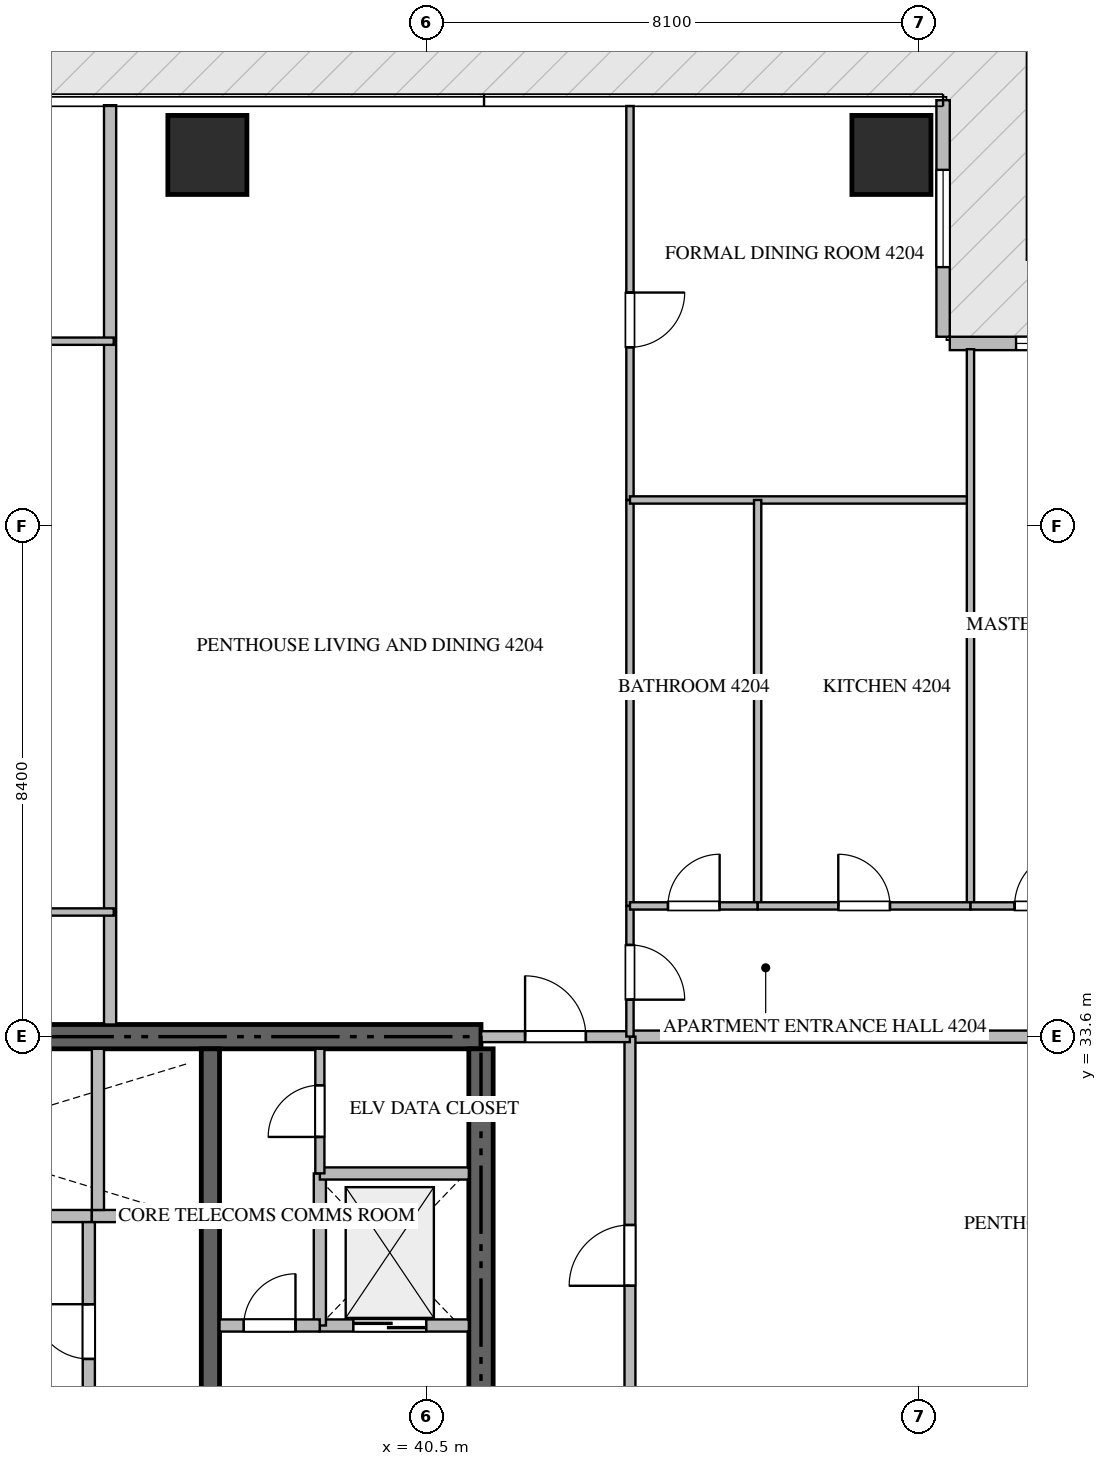
"""IFC4 building model, lengths in metres.
Left out: names, types, materials, properties, quantities, classifications, styles, units other than length and angle.
Written with IfcOpenShell. Run it as: python <this file> out.ifc"""

import sys

from ifc_helpers import new_model, si_unit, direction, frame, frame_2d, origin, origin_2d, place, context, subcontext, project, spatial, rectangle, extrude, source, transform, mapped, element, fill, save


model = new_model("IFC4")
c1 = context("Model", 3, precision=1e-05, world=origin(), true_north=direction((0.0, 1.0)))
c2 = subcontext(c1, "Body", "Model", "MODEL_VIEW")
j1 = project(units=[si_unit("LENGTHUNIT", "METRE"), si_unit("PLANEANGLEUNIT", "RADIAN")], contexts=[c1])
p1 = place(None, origin())
s1 = spatial("IfcSite", under=j1, at=p1, CompositionType="ELEMENT")
p2 = place(p1, origin())
s2 = spatial("IfcBuilding", under=s1, at=p2, CompositionType="ELEMENT")
p3 = place(p2, frame((0.0, 0.0, 168.9)))
s3 = spatial("IfcBuildingStorey", under=s2, at=p3, CompositionType="ELEMENT", Elevation=168.9)
p4 = place(p3, frame((41.4, 33.6, -0.26), z_axis=(0.0, 0.0, 1.0), x_axis=(-1.0, 0.0, 0.0)))
e1 = element("IfcWall", 1, at=p4, inside=s3, PredefinedType="SHEAR", context=c2, shape_type="SweptSolid", body=[
    extrude(rectangle(XDim=18.0, YDim=0.4, at=frame_2d((9.0, 0.0))), origin(), (0.0, 0.0, 1.0), 3.748),
])
p5 = place(p3, frame((41.4, 27.75, -0.26), z_axis=(0.0, 0.0, 1.0), x_axis=(0.0, 1.0, 0.0)))
e2 = element("IfcWall", 2, at=p5, inside=s3, PredefinedType="SHEAR", context=c2, shape_type="SweptSolid", body=[
    extrude(rectangle(XDim=5.65, YDim=0.4, at=frame_2d((2.825, 0.0))), origin(), (0.0, 0.0, 1.0), 3.748),
])
p6 = place(p3, frame((36.95, 27.05, -0.26), z_axis=(0.0, 0.0, 1.0), x_axis=(0.0, 1.0, 0.0)))
e3 = element("IfcWall", 3, at=p6, inside=s3, PredefinedType="SHEAR", context=c2, shape_type="SweptSolid", body=[
    extrude(rectangle(XDim=6.35, YDim=0.3, at=frame_2d((3.175, 0.0))), origin(), (0.0, 0.0, 1.0), 3.748),
])
m1 = source(origin(), c2, "Body", "SweptSolid", [
    extrude(rectangle(XDim=1.3, YDim=1.3, at=origin_2d()), origin(), (0.0, 0.0, 1.0), 3.75),
])
for number, where, z_axis, x_axis in (
    (4, (36.9, 48.1, -0.26), (0.0, 0.0, 1.0), (1.0, 0.0, 0.0)),
    (5, (48.15, 48.1, -0.26), (0.0, 0.0, 1.0), (1.0, 0.0, 0.0)),
):
    element("IfcColumn", number, at=place(p3, frame(where, z_axis=z_axis, x_axis=x_axis)), inside=s3, PredefinedType="COLUMN", context=c2, shape_type="MappedRepresentation", body=[
        mapped(m1, transform((0.0, 0.0, 0.0), scale=1.0)),
    ])
p7 = place(p3, frame((52.89, 45.0, 0.0), z_axis=(0.0, 0.0, 1.0), x_axis=(-1.0, 0.0, 0.0)))
e6 = element("IfcWall", 6, at=p7, inside=s3, PredefinedType="ELEMENTEDWALL", context=c2, shape_type="SweptSolid", body=[
    extrude(rectangle(XDim=3.78, YDim=0.22, at=frame_2d((1.89, 0.0))), origin(), (0.0, 0.0, 1.0), 3.475),
])
p8 = place(p7, frame((1.09, 0.0, 0.65)))
e7 = element("IfcOpeningElement", 7, at=p8, cuts=e6, PredefinedType="OPENING", context=c2, shape_type="SweptSolid", body=[
    extrude(rectangle(XDim=1.6, YDim=2.1, at=frame_2d((0.8, 1.05))), frame((0.0, 0.12, 0.0), z_axis=(0.0, -1.0, 0.0), x_axis=(1.0, 0.0, 0.0)), (0.0, 0.0, 1.0), 0.24),
])
p9 = place(p3, frame((49.0, 45.11, 0.0), z_axis=(0.0, 0.0, 1.0), x_axis=(0.0, 1.0, 0.0)))
e8 = element("IfcWall", 8, at=p9, inside=s3, PredefinedType="ELEMENTEDWALL", context=c2, shape_type="SweptSolid", body=[
    extrude(rectangle(XDim=3.89, YDim=0.22, at=frame_2d((1.945, 0.0))), origin(), (0.0, 0.0, 1.0), 3.475),
])
p10 = place(p9, frame((1.145, 0.0, 0.65)))
e9 = element("IfcOpeningElement", 9, at=p10, cuts=e8, PredefinedType="OPENING", context=c2, shape_type="SweptSolid", body=[
    extrude(rectangle(XDim=1.6, YDim=2.1, at=frame_2d((0.8, 1.05))), frame((0.0, 0.12, 0.0), z_axis=(0.0, -1.0, 0.0), x_axis=(1.0, 0.0, 0.0)), (0.0, 0.0, 1.0), 0.24),
])
p11 = place(p3, frame((38.75, 28.85, 0.0), z_axis=(0.0, 0.0, 1.0), x_axis=(1.0, 0.0, 0.0)))
e10 = element("IfcWall", 10, at=p11, inside=s3, PredefinedType="STANDARD", context=c2, shape_type="SweptSolid", body=[
    extrude(rectangle(XDim=2.45, YDim=0.2, at=frame_2d((1.225, 0.0))), origin(), (0.0, 0.0, 1.0), 3.49),
])
p12 = place(p11, frame((0.55, 0.0, 0.0)))
e11 = element("IfcOpeningElement", 11, at=p12, cuts=e10, PredefinedType="OPENING", context=c2, shape_type="SweptSolid", body=[
    extrude(rectangle(XDim=1.2, YDim=2.2, at=frame_2d((0.6, 1.1))), frame((0.0, 0.11, 0.0), z_axis=(0.0, -1.0, 0.0), x_axis=(1.0, 0.0, 0.0)), (0.0, 0.0, 1.0), 0.22),
])
p13 = place(p3, frame((32.85, 30.65, 0.0), z_axis=(0.0, 0.0, 1.0), x_axis=(1.0, 0.0, 0.0)))
e12 = element("IfcWall", 12, at=p13, inside=s3, PredefinedType="STANDARD", context=c2, shape_type="SweptSolid", body=[
    extrude(rectangle(XDim=2.15, YDim=0.2, at=frame_2d((1.075, 0.0))), origin(), (0.0, 0.0, 1.0), 3.49),
])
p14 = place(p3, frame((35.0, 30.65, 0.0), z_axis=(0.0, 0.0, 1.0), x_axis=(1.0, 0.0, 0.0)))
e13 = element("IfcWall", 13, at=p14, inside=s3, PredefinedType="STANDARD", context=c2, shape_type="SweptSolid", body=[
    extrude(rectangle(XDim=1.8, YDim=0.2, at=frame_2d((0.9, 0.0))), origin(), (0.0, 0.0, 1.0), 3.49),
])
p15 = place(p3, frame((35.1, 30.75, 0.0), z_axis=(0.0, 0.0, 1.0), x_axis=(0.0, 1.0, 0.0)))
e14 = element("IfcWall", 14, at=p15, inside=s3, PredefinedType="STANDARD", context=c2, shape_type="SweptSolid", body=[
    extrude(rectangle(XDim=2.65, YDim=0.2, at=frame_2d((1.325, 0.0))), origin(), (0.0, 0.0, 1.0), 3.49),
])
p16 = place(p3, frame((38.75, 28.85, 0.0), z_axis=(0.0, 0.0, 1.0), x_axis=(0.0, 1.0, 0.0)))
e15 = element("IfcWall", 15, at=p16, inside=s3, PredefinedType="STANDARD", context=c2, shape_type="SweptSolid", body=[
    extrude(rectangle(XDim=2.5, YDim=0.2, at=frame_2d((1.25, 0.0))), origin(), (0.0, 0.0, 1.0), 3.49),
])
p17 = place(p3, frame((38.75, 31.35, 0.0), z_axis=(0.0, 0.0, 1.0), x_axis=(1.0, 0.0, 0.0)))
e16 = element("IfcWall", 16, at=p17, inside=s3, PredefinedType="STANDARD", context=c2, shape_type="SweptSolid", body=[
    extrude(rectangle(XDim=2.45, YDim=0.2, at=frame_2d((1.225, 0.0))), origin(), (0.0, 0.0, 1.0), 3.49),
])
p18 = place(p3, frame((37.1, 28.85, 0.0), z_axis=(0.0, 0.0, 1.0), x_axis=(1.0, 0.0, 0.0)))
e17 = element("IfcWall", 17, at=p18, inside=s3, PredefinedType="STANDARD", context=c2, shape_type="SweptSolid", body=[
    extrude(rectangle(XDim=1.648, YDim=0.2, at=frame_2d((0.824, 0.0))), origin(), (0.0, 0.0, 1.0), 3.49),
])
p19 = place(p18, frame((0.399, 0.0, 0.0)))
e18 = element("IfcOpeningElement", 18, at=p19, cuts=e17, PredefinedType="OPENING", context=c2, shape_type="SweptSolid", body=[
    extrude(rectangle(XDim=0.85, YDim=2.1, at=frame_2d((0.425, 1.05))), frame((0.0, 0.11, 0.0), z_axis=(0.0, -1.0, 0.0), x_axis=(1.0, 0.0, 0.0)), (0.0, 0.0, 1.0), 0.22),
])
p20 = place(p3, frame((38.75, 31.352, 0.0), z_axis=(0.0, 0.0, 1.0), x_axis=(0.0, 1.0, 0.0)))
e19 = element("IfcWall", 19, at=p20, inside=s3, PredefinedType="PARTITIONING", context=c2, shape_type="SweptSolid", body=[
    extrude(rectangle(XDim=2.048, YDim=0.15, at=frame_2d((1.024, 0.0))), origin(), (0.0, 0.0, 1.0), 3.49),
])
p21 = place(p20, frame((0.599, 0.0, 0.0)))
e20 = element("IfcOpeningElement", 20, at=p21, cuts=e19, PredefinedType="OPENING", context=c2, shape_type="SweptSolid", body=[
    extrude(rectangle(XDim=0.85, YDim=2.1, at=frame_2d((0.425, 1.05))), frame((0.0, 0.085, 0.0), z_axis=(0.0, -1.0, 0.0), x_axis=(1.0, 0.0, 0.0)), (0.0, 0.0, 1.0), 0.17),
])
p22 = place(p3, frame((34.95, 26.95, 0.0), z_axis=(0.0, 0.0, 1.0), x_axis=(0.0, 1.0, 0.0)))
e21 = element("IfcWall", 21, at=p22, inside=s3, PredefinedType="STANDARD", context=c2, shape_type="SweptSolid", body=[
    extrude(rectangle(XDim=3.6, YDim=0.2, at=frame_2d((1.8, 0.0))), origin(), (0.0, 0.0, 1.0), 3.49),
])
p23 = place(p22, frame((1.35, 0.0, 0.0)))
e22 = element("IfcOpeningElement", 22, at=p23, cuts=e21, PredefinedType="OPENING", context=c2, shape_type="SweptSolid", body=[
    extrude(rectangle(XDim=0.9, YDim=2.1, at=frame_2d((0.45, 1.05))), frame((0.0, 0.11, 0.0), z_axis=(0.0, -1.0, 0.0), x_axis=(1.0, 0.0, 0.0)), (0.0, 0.0, 1.0), 0.22),
])
p24 = place(p3, frame((35.3, 33.8, 0.0), z_axis=(0.0, 0.0, 1.0), x_axis=(0.0, 1.0, 0.0)))
e23 = element("IfcWall", 23, at=p24, inside=s3, PredefinedType="PARTITIONING", context=c2, shape_type="SweptSolid", body=[
    extrude(rectangle(XDim=15.118, YDim=0.2, at=frame_2d((7.559, 0.0))), origin(), (0.0, 0.0, 1.0), 3.49),
])
p25 = place(p3, frame((43.85, 33.6, 0.0), z_axis=(0.0, 0.0, 1.0), x_axis=(1.0, 0.0, 0.0)))
e24 = element("IfcWall", 24, at=p25, inside=s3, PredefinedType="PARTITIONING", context=c2, shape_type="SweptSolid", body=[
    extrude(rectangle(XDim=13.068, YDim=0.2, at=frame_2d((6.534, 0.0))), origin(), (0.0, 0.0, 1.0), 3.49),
])
p26 = place(p3, frame((43.85, 14.9, 0.0), z_axis=(0.0, 0.0, 1.0), x_axis=(0.0, 1.0, 0.0)))
e25 = element("IfcWall", 25, at=p26, inside=s3, PredefinedType="PARTITIONING", context=c2, shape_type="SweptSolid", body=[
    extrude(rectangle(XDim=18.7, YDim=0.18, at=frame_2d((9.35, 0.0))), origin(), (0.0, 0.0, 1.0), 3.49),
])
p27 = place(p26, frame((14.603, 0.0, 0.0)))
e26 = element("IfcOpeningElement", 26, at=p27, cuts=e25, PredefinedType="OPENING", context=c2, shape_type="SweptSolid", body=[
    extrude(rectangle(XDim=1.0, YDim=2.15, at=frame_2d((0.5, 1.075))), frame((0.0, 0.1, 0.0), z_axis=(0.0, -1.0, 0.0), x_axis=(1.0, 0.0, 0.0)), (0.0, 0.0, 1.0), 0.2),
])
p28 = place(p3, frame((41.402, 33.6, 0.0), z_axis=(0.0, 0.0, 1.0), x_axis=(1.0, 0.0, 0.0)))
e27 = element("IfcWall", 27, at=p28, inside=s3, PredefinedType="PARTITIONING", context=c2, shape_type="SweptSolid", body=[
    extrude(rectangle(XDim=2.446, YDim=0.18, at=frame_2d((1.223, 0.0))), origin(), (0.0, 0.0, 1.0), 3.49),
])
p29 = place(p28, frame((0.723, 0.0, 0.0)))
e28 = element("IfcOpeningElement", 28, at=p29, cuts=e27, PredefinedType="OPENING", context=c2, shape_type="SweptSolid", body=[
    extrude(rectangle(XDim=1.0, YDim=2.15, at=frame_2d((0.5, 1.075))), frame((0.0, 0.1, 0.0), z_axis=(0.0, -1.0, 0.0), x_axis=(1.0, 0.0, 0.0)), (0.0, 0.0, 1.0), 0.2),
])
for number, where, z_axis, x_axis in (
    (29, (26.3, 45.037, 0.0), (0.0, 0.0, 1.0), (1.0, 0.0, 0.0)),
    (30, (26.3, 35.65, 0.0), (0.0, 0.0, 1.0), (1.0, 0.0, 0.0)),
):
    element("IfcWall", number, at=place(p3, frame(where, z_axis=z_axis, x_axis=x_axis)), inside=s3, PredefinedType="PARTITIONING", context=c2, shape_type="SweptSolid", body=[
        extrude(rectangle(XDim=9.06, YDim=0.12, at=frame_2d((4.53, 0.0))), origin(), (0.0, 0.0, 1.0), 3.49),
    ])
p30 = place(p3, frame((43.85, 35.75, 0.0), z_axis=(0.0, 0.0, 1.0), x_axis=(0.0, -1.0, 0.0)))
e31 = element("IfcWall", 31, at=p30, inside=s3, PredefinedType="PARTITIONING", context=c2, shape_type="SweptSolid", body=[
    extrude(rectangle(XDim=2.148, YDim=0.12, at=frame_2d((1.074, 0.0))), origin(), (0.0, 0.0, 1.0), 3.49),
])
p31 = place(p30, frame((0.642, 0.0, 0.0)))
e32 = element("IfcOpeningElement", 32, at=p31, cuts=e31, PredefinedType="OPENING", context=c2, shape_type="SweptSolid", body=[
    extrude(rectangle(XDim=0.9, YDim=2.1, at=frame_2d((0.45, 1.05))), frame((0.0, 0.07, 0.0), z_axis=(0.0, -1.0, 0.0), x_axis=(1.0, 0.0, 0.0)), (0.0, 0.0, 1.0), 0.14),
])
p32 = place(p3, frame((43.85, 48.905, 0.0), z_axis=(0.0, 0.0, 1.0), x_axis=(0.0, -1.0, 0.0)))
e33 = element("IfcWall", 33, at=p32, inside=s3, PredefinedType="PARTITIONING", context=c2, shape_type="SweptSolid", body=[
    extrude(rectangle(XDim=6.479, YDim=0.12, at=frame_2d((3.24, 0.0))), origin(), (0.0, 0.0, 1.0), 3.49),
])
p33 = place(p32, frame((3.068, 0.0, 0.0)))
e34 = element("IfcOpeningElement", 34, at=p33, cuts=e33, PredefinedType="OPENING", context=c2, shape_type="SweptSolid", body=[
    extrude(rectangle(XDim=0.9, YDim=2.1, at=frame_2d((0.45, 1.05))), frame((0.0, 0.07, 0.0), z_axis=(0.0, -1.0, 0.0), x_axis=(1.0, 0.0, 0.0)), (0.0, 0.0, 1.0), 0.14),
])
p34 = place(p3, frame((43.85, 42.424, 0.0), z_axis=(0.0, 0.0, 1.0), x_axis=(0.0, -1.0, 0.0)))
e35 = element("IfcWall", 35, at=p34, inside=s3, PredefinedType="PARTITIONING", context=c2, shape_type="SweptSolid", body=[
    extrude(rectangle(XDim=6.672, YDim=0.12, at=frame_2d((3.336, 0.0))), origin(), (0.0, 0.0, 1.0), 3.49),
])
p35 = place(p3, frame((43.85, 42.426, 0.0), z_axis=(0.0, 0.0, 1.0), x_axis=(1.0, 0.0, 0.0)))
e36 = element("IfcWall", 36, at=p35, inside=s3, PredefinedType="PARTITIONING", context=c2, shape_type="SweptSolid", body=[
    extrude(rectangle(XDim=5.6, YDim=0.12, at=frame_2d((2.8, 0.0))), origin(), (0.0, 0.0, 1.0), 3.49),
])
p36 = place(p3, frame((49.45, 44.905, 0.0), z_axis=(0.0, 0.0, 1.0), x_axis=(0.0, -1.0, 0.0)))
e37 = element("IfcWall", 37, at=p36, inside=s3, PredefinedType="PARTITIONING", context=c2, shape_type="SweptSolid", body=[
    extrude(rectangle(XDim=9.155, YDim=0.12, at=frame_2d((4.578, 0.0))), origin(), (0.0, 0.0, 1.0), 3.49),
])
p37 = place(p3, frame((45.95, 42.426, 0.0), z_axis=(0.0, 0.0, 1.0), x_axis=(0.0, -1.0, 0.0)))
e38 = element("IfcWall", 38, at=p37, inside=s3, PredefinedType="PARTITIONING", context=c2, shape_type="SweptSolid", body=[
    extrude(rectangle(XDim=6.676, YDim=0.12, at=frame_2d((3.338, 0.0))), origin(), (0.0, 0.0, 1.0), 3.49),
])
p38 = place(p3, frame((43.85, 35.75, 0.0), z_axis=(0.0, 0.0, 1.0), x_axis=(1.0, 0.0, 0.0)))
e39 = element("IfcWall", 39, at=p38, inside=s3, PredefinedType="PARTITIONING", context=c2, shape_type="SweptSolid", body=[
    extrude(rectangle(XDim=2.1, YDim=0.12, at=frame_2d((1.05, 0.0))), origin(), (0.0, 0.0, 1.0), 3.49),
])
p39 = place(p38, frame((0.625, 0.0, 0.0)))
e40 = element("IfcOpeningElement", 40, at=p39, cuts=e39, PredefinedType="OPENING", context=c2, shape_type="SweptSolid", body=[
    extrude(rectangle(XDim=0.85, YDim=2.1, at=frame_2d((0.425, 1.05))), frame((0.0, 0.07, 0.0), z_axis=(0.0, -1.0, 0.0), x_axis=(1.0, 0.0, 0.0)), (0.0, 0.0, 1.0), 0.14),
])
p40 = place(p3, frame((45.952, 35.75, 0.0), z_axis=(0.0, 0.0, 1.0), x_axis=(1.0, 0.0, 0.0)))
e41 = element("IfcWall", 41, at=p40, inside=s3, PredefinedType="PARTITIONING", context=c2, shape_type="SweptSolid", body=[
    extrude(rectangle(XDim=3.498, YDim=0.12, at=frame_2d((1.749, 0.0))), origin(), (0.0, 0.0, 1.0), 3.49),
])
p41 = place(p40, frame((1.324, 0.0, 0.0)))
e42 = element("IfcOpeningElement", 42, at=p41, cuts=e41, PredefinedType="OPENING", context=c2, shape_type="SweptSolid", body=[
    extrude(rectangle(XDim=0.85, YDim=2.1, at=frame_2d((0.425, 1.05))), frame((0.0, 0.07, 0.0), z_axis=(0.0, -1.0, 0.0), x_axis=(1.0, 0.0, 0.0)), (0.0, 0.0, 1.0), 0.14),
])
p42 = place(p3, frame((49.452, 35.75, 0.0), z_axis=(0.0, 0.0, 1.0), x_axis=(1.0, 0.0, 0.0)))
e43 = element("IfcWall", 43, at=p42, inside=s3, PredefinedType="PARTITIONING", context=c2, shape_type="SweptSolid", body=[
    extrude(rectangle(XDim=2.348, YDim=0.12, at=frame_2d((1.174, 0.0))), origin(), (0.0, 0.0, 1.0), 3.49),
])
p43 = place(p42, frame((0.724, 0.0, 0.0)))
e44 = element("IfcOpeningElement", 44, at=p43, cuts=e43, PredefinedType="OPENING", context=c2, shape_type="SweptSolid", body=[
    extrude(rectangle(XDim=0.9, YDim=2.1, at=frame_2d((0.45, 1.05))), frame((0.0, 0.07, 0.0), z_axis=(0.0, -1.0, 0.0), x_axis=(1.0, 0.0, 0.0)), (0.0, 0.0, 1.0), 0.14),
])
m2 = source(origin(), c2, "Body", "SweptSolid", [
    extrude(rectangle(XDim=1.6, YDim=2.1, at=frame_2d((0.8, 1.05))), frame((0.0, 0.03, 0.0), z_axis=(0.0, -1.0, 0.0), x_axis=(1.0, 0.0, 0.0)), (0.0, 0.0, 1.0), 0.06),
])
p44 = place(p8, origin())
e45 = element("IfcWindow", 45, at=p44, inside=s3, PartitioningType="SINGLE_PANEL", PredefinedType="WINDOW", context=c2, shape_type="MappedRepresentation", body=[
    mapped(m2, transform((0.0, 0.0, 0.0), scale=1.0)),
])
fill(e7, e45)
p45 = place(p10, origin())
e46 = element("IfcWindow", 46, at=p45, inside=s3, PartitioningType="SINGLE_PANEL", PredefinedType="WINDOW", context=c2, shape_type="MappedRepresentation", body=[
    mapped(m2, transform((0.0, 0.0, 0.0), scale=1.0)),
])
fill(e9, e46)
m3 = source(origin(), c2, "Body", "SweptSolid", [
    extrude(rectangle(XDim=1.2, YDim=2.2, at=frame_2d((0.6, 1.1))), frame((0.0, 0.025, 0.0), z_axis=(0.0, -1.0, 0.0), x_axis=(1.0, 0.0, 0.0)), (0.0, 0.0, 1.0), 0.05),
])
p46 = place(p12, origin())
e47 = element("IfcDoor", 47, at=p46, inside=s3, OperationType="DOUBLE_DOOR_SLIDING", PredefinedType="DOOR", context=c2, shape_type="MappedRepresentation", body=[
    mapped(m3, transform((0.0, 0.0, 0.0), scale=1.0)),
])
fill(e11, e47)
m4 = source(origin(), c2, "Body", "SweptSolid", [
    extrude(rectangle(XDim=0.85, YDim=2.1, at=frame_2d((0.425, 1.05))), frame((0.0, 0.025, 0.0), z_axis=(0.0, -1.0, 0.0), x_axis=(1.0, 0.0, 0.0)), (0.0, 0.0, 1.0), 0.05),
])
p47 = place(p19, origin())
e48 = element("IfcDoor", 48, at=p47, inside=s3, OperationType="SINGLE_SWING_RIGHT", PredefinedType="DOOR", context=c2, shape_type="MappedRepresentation", body=[
    mapped(m4, transform((0.0, 0.0, 0.0), scale=1.0)),
])
fill(e18, e48)
p48 = place(p21, origin())
e49 = element("IfcDoor", 49, at=p48, inside=s3, OperationType="SINGLE_SWING_LEFT", PredefinedType="DOOR", context=c2, shape_type="MappedRepresentation", body=[
    mapped(m4, transform((0.0, 0.0, 0.0), scale=1.0)),
])
fill(e20, e49)
m5 = source(origin(), c2, "Body", "SweptSolid", [
    extrude(rectangle(XDim=0.9, YDim=2.1, at=frame_2d((0.45, 1.05))), frame((0.0, 0.025, 0.0), z_axis=(0.0, -1.0, 0.0), x_axis=(1.0, 0.0, 0.0)), (0.0, 0.0, 1.0), 0.05),
])
p49 = place(p23, origin())
e50 = element("IfcDoor", 50, at=p49, inside=s3, OperationType="SINGLE_SWING_RIGHT", PredefinedType="DOOR", context=c2, shape_type="MappedRepresentation", body=[
    mapped(m5, transform((0.0, 0.0, 0.0), scale=1.0)),
])
fill(e22, e50)
m6 = source(origin(), c2, "Body", "SweptSolid", [
    extrude(rectangle(XDim=1.0, YDim=2.15, at=frame_2d((0.5, 1.075))), frame((0.0, 0.025, 0.0), z_axis=(0.0, -1.0, 0.0), x_axis=(1.0, 0.0, 0.0)), (0.0, 0.0, 1.0), 0.05),
])
p50 = place(p27, origin())
e51 = element("IfcDoor", 51, at=p50, inside=s3, OperationType="SINGLE_SWING_LEFT", PredefinedType="DOOR", context=c2, shape_type="MappedRepresentation", body=[
    mapped(m6, transform((0.0, 0.0, 0.0), scale=1.0)),
])
fill(e26, e51)
p51 = place(p29, origin())
e52 = element("IfcDoor", 52, at=p51, inside=s3, OperationType="SINGLE_SWING_LEFT", PredefinedType="DOOR", context=c2, shape_type="MappedRepresentation", body=[
    mapped(m6, transform((0.0, 0.0, 0.0), scale=1.0)),
])
fill(e28, e52)
p52 = place(p31, origin())
e53 = element("IfcDoor", 53, at=p52, inside=s3, OperationType="SINGLE_SWING_RIGHT", PredefinedType="DOOR", context=c2, shape_type="MappedRepresentation", body=[
    mapped(m5, transform((0.0, 0.0, 0.0), scale=1.0)),
])
fill(e32, e53)
p53 = place(p33, origin())
e54 = element("IfcDoor", 54, at=p53, inside=s3, OperationType="SINGLE_SWING_LEFT", PredefinedType="DOOR", context=c2, shape_type="MappedRepresentation", body=[
    mapped(m5, transform((0.0, 0.0, 0.0), scale=1.0)),
])
fill(e34, e54)
p54 = place(p39, origin())
e55 = element("IfcDoor", 55, at=p54, inside=s3, OperationType="SINGLE_SWING_RIGHT", PredefinedType="DOOR", context=c2, shape_type="MappedRepresentation", body=[
    mapped(m4, transform((0.0, 0.0, 0.0), scale=1.0)),
])
fill(e40, e55)
p55 = place(p41, origin())
e56 = element("IfcDoor", 56, at=p55, inside=s3, OperationType="SINGLE_SWING_LEFT", PredefinedType="DOOR", context=c2, shape_type="MappedRepresentation", body=[
    mapped(m4, transform((0.0, 0.0, 0.0), scale=1.0)),
])
fill(e42, e56)
p56 = place(p43, origin())
e57 = element("IfcDoor", 57, at=p56, inside=s3, OperationType="SINGLE_SWING_RIGHT", PredefinedType="DOOR", context=c2, shape_type="MappedRepresentation", body=[
    mapped(m5, transform((0.0, 0.0, 0.0), scale=1.0)),
])
fill(e44, e57)
save(model, sys.argv[1])
